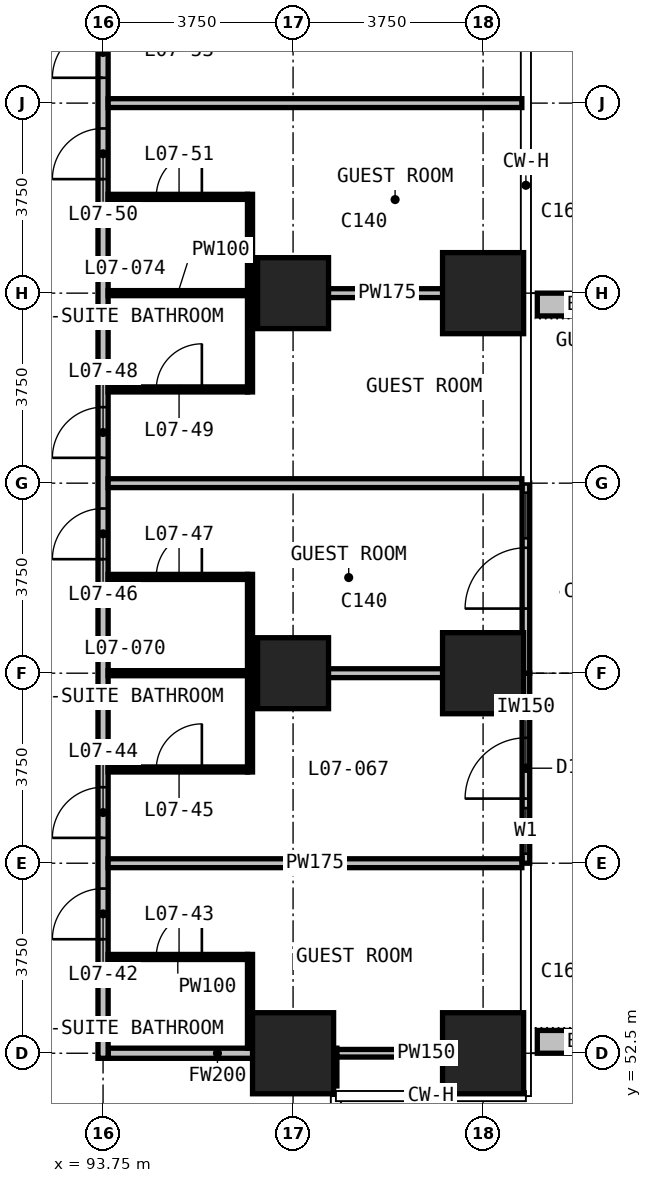
"""IFC4 building model, lengths in metres.
Left out: names, types, materials, properties, quantities, classifications, styles, units other than length and angle.
Written with IfcOpenShell. Run it as: python <this file> out.ifc"""

import sys

from ifc_helpers import new_model, si_unit, direction, frame, frame_2d, origin, origin_2d, place, context, subcontext, project, spatial, rectangle, extrude, element, fill, save


model = new_model("IFC4")
c1 = context("Model", 3, precision=1e-05, world=origin(), true_north=direction((0.0, 1.0)))
c2 = subcontext(c1, "Body", "Model", "MODEL_VIEW")
j1 = project(units=[si_unit("LENGTHUNIT", "METRE"), si_unit("PLANEANGLEUNIT", "RADIAN")], contexts=[c1])
p1 = place(None, origin())
s1 = spatial("IfcSite", under=j1, at=p1, CompositionType="ELEMENT")
p2 = place(p1, origin())
s2 = spatial("IfcBuilding", under=s1, at=p2, CompositionType="ELEMENT")
p3 = place(p2, frame((0.0, 0.0, 42.8)))
s3 = spatial("IfcBuildingStorey", under=s2, at=p3, CompositionType="ELEMENT", Elevation=42.8)
p4 = place(p3, frame((97.5, 52.5, 0.0), z_axis=(0.0, 0.0, 1.0), x_axis=(1.0, 0.0, 0.0)))
e1 = element("IfcColumn", 1, at=p4, inside=s3, PredefinedType="COLUMN", context=c2, shape_type="SweptSolid", body=[
    extrude(rectangle(XDim=1.6, YDim=1.6, at=origin_2d()), origin(), (0.0, 0.0, 1.0), 3.3),
])
for number, where, z_axis, x_axis in (
    (2, (97.5, 60.0, 0.0), (0.0, 0.0, 1.0), (1.0, 0.0, 0.0)),
    (3, (97.5, 67.5, 0.0), (0.0, 0.0, 1.0), (1.0, 0.0, 0.0)),
):
    element("IfcColumn", number, at=place(p3, frame(where, z_axis=z_axis, x_axis=x_axis)), inside=s3, PredefinedType="COLUMN", context=c2, shape_type="SweptSolid", body=[
        extrude(rectangle(XDim=1.4, YDim=1.4, at=origin_2d()), origin(), (0.0, 0.0, 1.0), 3.3),
    ])
for number, where, z_axis, x_axis in (
    (4, (101.25, 52.5, 0.0), (0.0, 0.0, 1.0), (1.0, 0.0, 0.0)),
    (5, (101.25, 60.0, 0.0), (0.0, 0.0, 1.0), (1.0, 0.0, 0.0)),
    (6, (101.25, 67.5, 0.0), (0.0, 0.0, 1.0), (1.0, 0.0, 0.0)),
):
    element("IfcColumn", number, at=place(p3, frame(where, z_axis=z_axis, x_axis=x_axis)), inside=s3, PredefinedType="COLUMN", context=c2, shape_type="SweptSolid", body=[
        extrude(rectangle(XDim=1.6, YDim=1.6, at=origin_2d()), origin(), (0.0, 0.0, 1.0), 3.3),
    ])
p5 = place(p3, frame((102.095, 56.25, 0.0), z_axis=(0.0, 0.0, 1.0), x_axis=(0.0, 1.0, 0.0)))
e7 = element("IfcWall", 7, at=p5, inside=s3, PredefinedType="SOLIDWALL", context=c2, shape_type="SweptSolid", body=[
    extrude(rectangle(XDim=3.75, YDim=0.15, at=frame_2d((1.875, 0.0))), origin(), (0.0, 0.0, 1.0), 3.0),
])
p6 = place(p5, frame((0.188, 0.0, 0.1)))
e8 = element("IfcOpeningElement", 8, at=p6, cuts=e7, PredefinedType="OPENING", context=c2, shape_type="SweptSolid", body=[
    extrude(rectangle(XDim=0.9, YDim=2.4, at=frame_2d((0.45, 1.2))), frame((0.0, 0.085, 0.0), z_axis=(0.0, -1.0, 0.0), x_axis=(1.0, 0.0, 0.0)), (0.0, 0.0, 1.0), 0.17),
])
p7 = place(p5, frame((1.275, 0.0, 0.0)))
e9 = element("IfcOpeningElement", 9, at=p7, cuts=e7, PredefinedType="OPENING", context=c2, shape_type="SweptSolid", body=[
    extrude(rectangle(XDim=1.2, YDim=2.4, at=frame_2d((0.6, 1.2))), frame((0.0, 0.085, 0.0), z_axis=(0.0, -1.0, 0.0), x_axis=(1.0, 0.0, 0.0)), (0.0, 0.0, 1.0), 0.17),
])
p8 = place(p3, frame((102.095, 60.0, 0.0), z_axis=(0.0, 0.0, 1.0), x_axis=(0.0, 1.0, 0.0)))
e10 = element("IfcWall", 10, at=p8, inside=s3, PredefinedType="SOLIDWALL", context=c2, shape_type="SweptSolid", body=[
    extrude(rectangle(XDim=3.75, YDim=0.15, at=frame_2d((1.875, 0.0))), origin(), (0.0, 0.0, 1.0), 3.0),
])
p9 = place(p8, frame((1.275, 0.0, 0.0)))
e11 = element("IfcOpeningElement", 11, at=p9, cuts=e10, PredefinedType="OPENING", context=c2, shape_type="SweptSolid", body=[
    extrude(rectangle(XDim=1.2, YDim=2.4, at=frame_2d((0.6, 1.2))), frame((0.0, 0.085, 0.0), z_axis=(0.0, -1.0, 0.0), x_axis=(1.0, 0.0, 0.0)), (0.0, 0.0, 1.0), 0.17),
])
p10 = place(p8, frame((2.663, 0.0, 0.1)))
e12 = element("IfcOpeningElement", 12, at=p10, cuts=e10, PredefinedType="OPENING", context=c2, shape_type="SweptSolid", body=[
    extrude(rectangle(XDim=0.9, YDim=2.4, at=frame_2d((0.45, 1.2))), frame((0.0, 0.085, 0.0), z_axis=(0.0, -1.0, 0.0), x_axis=(1.0, 0.0, 0.0)), (0.0, 0.0, 1.0), 0.17),
])
for number, where, z_axis, x_axis in (
    (13, (102.32, 52.725, 0.0), (0.0, 0.0, 1.0), (1.0, 0.0, 0.0)),
    (14, (102.32, 67.275, 0.0), (0.0, 0.0, 1.0), (1.0, 0.0, 0.0)),
):
    element("IfcWall", number, at=place(p3, frame(where, z_axis=z_axis, x_axis=x_axis)), inside=s3, PredefinedType="USERDEFINED", context=c2, shape_type="SweptSolid", body=[
        extrude(rectangle(XDim=2.33, YDim=0.45, at=frame_2d((1.165, 0.0))), origin(), (0.0, 0.0, 1.0), 1.1),
    ])
p11 = place(p3, frame((93.85, 52.5, 0.0), z_axis=(0.0, 0.0, 1.0), x_axis=(1.0, 0.0, 0.0)))
e15 = element("IfcWall", 15, at=p11, inside=s3, PredefinedType="PARTITIONING", context=c2, shape_type="SweptSolid", body=[
    extrude(rectangle(XDim=4.315, YDim=0.2, at=frame_2d((2.157, 0.0))), origin(), (0.0, 0.0, 1.0), 3.0),
])
p12 = place(p3, frame((93.75, 52.4, 0.0), z_axis=(0.0, 0.0, 1.0), x_axis=(0.0, 1.0, 0.0)))
e16 = element("IfcWall", 16, at=p12, inside=s3, PredefinedType="PARTITIONING", context=c2, shape_type="SweptSolid", body=[
    extrude(rectangle(XDim=33.925, YDim=0.2, at=frame_2d((16.962, 0.0))), origin(), (0.0, 0.0, 1.0), 3.0),
])
p13 = place(p12, frame((2.35, 0.0, 0.0)))
e17 = element("IfcOpeningElement", 17, at=p13, cuts=e16, PredefinedType="OPENING", context=c2, shape_type="SweptSolid", body=[
    extrude(rectangle(XDim=1.0, YDim=2.2, at=frame_2d((0.5, 1.1))), frame((0.0, 0.11, 0.0), z_axis=(0.0, -1.0, 0.0), x_axis=(1.0, 0.0, 0.0)), (0.0, 0.0, 1.0), 0.22),
])
p14 = place(p12, frame((4.35, 0.0, 0.0)))
e18 = element("IfcOpeningElement", 18, at=p14, cuts=e16, PredefinedType="OPENING", context=c2, shape_type="SweptSolid", body=[
    extrude(rectangle(XDim=1.0, YDim=2.2, at=frame_2d((0.5, 1.1))), frame((0.0, 0.11, 0.0), z_axis=(0.0, -1.0, 0.0), x_axis=(1.0, 0.0, 0.0)), (0.0, 0.0, 1.0), 0.22),
])
p15 = place(p12, frame((9.85, 0.0, 0.0)))
e19 = element("IfcOpeningElement", 19, at=p15, cuts=e16, PredefinedType="OPENING", context=c2, shape_type="SweptSolid", body=[
    extrude(rectangle(XDim=1.0, YDim=2.2, at=frame_2d((0.5, 1.1))), frame((0.0, 0.11, 0.0), z_axis=(0.0, -1.0, 0.0), x_axis=(1.0, 0.0, 0.0)), (0.0, 0.0, 1.0), 0.22),
])
p16 = place(p12, frame((11.85, 0.0, 0.0)))
e20 = element("IfcOpeningElement", 20, at=p16, cuts=e16, PredefinedType="OPENING", context=c2, shape_type="SweptSolid", body=[
    extrude(rectangle(XDim=1.0, YDim=2.2, at=frame_2d((0.5, 1.1))), frame((0.0, 0.11, 0.0), z_axis=(0.0, -1.0, 0.0), x_axis=(1.0, 0.0, 0.0)), (0.0, 0.0, 1.0), 0.22),
])
p17 = place(p12, frame((17.35, 0.0, 0.0)))
e21 = element("IfcOpeningElement", 21, at=p17, cuts=e16, PredefinedType="OPENING", context=c2, shape_type="SweptSolid", body=[
    extrude(rectangle(XDim=1.0, YDim=2.2, at=frame_2d((0.5, 1.1))), frame((0.0, 0.11, 0.0), z_axis=(0.0, -1.0, 0.0), x_axis=(1.0, 0.0, 0.0)), (0.0, 0.0, 1.0), 0.22),
])
p18 = place(p12, frame((19.35, 0.0, 0.0)))
e22 = element("IfcOpeningElement", 22, at=p18, cuts=e16, PredefinedType="OPENING", context=c2, shape_type="SweptSolid", body=[
    extrude(rectangle(XDim=1.0, YDim=2.2, at=frame_2d((0.5, 1.1))), frame((0.0, 0.11, 0.0), z_axis=(0.0, -1.0, 0.0), x_axis=(1.0, 0.0, 0.0)), (0.0, 0.0, 1.0), 0.22),
])
p19 = place(p12, frame((24.85, 0.0, 0.0)))
e23 = element("IfcOpeningElement", 23, at=p19, cuts=e16, PredefinedType="OPENING", context=c2, shape_type="SweptSolid", body=[
    extrude(rectangle(XDim=1.0, YDim=2.2, at=frame_2d((0.5, 1.1))), frame((0.0, 0.11, 0.0), z_axis=(0.0, -1.0, 0.0), x_axis=(1.0, 0.0, 0.0)), (0.0, 0.0, 1.0), 0.22),
])
p20 = place(p12, frame((26.85, 0.0, 0.0)))
e24 = element("IfcOpeningElement", 24, at=p20, cuts=e16, PredefinedType="OPENING", context=c2, shape_type="SweptSolid", body=[
    extrude(rectangle(XDim=1.0, YDim=2.2, at=frame_2d((0.5, 1.1))), frame((0.0, 0.11, 0.0), z_axis=(0.0, -1.0, 0.0), x_axis=(1.0, 0.0, 0.0)), (0.0, 0.0, 1.0), 0.22),
])
p21 = place(p12, frame((31.55, 0.0, 0.0)))
e25 = element("IfcOpeningElement", 25, at=p21, cuts=e16, PredefinedType="OPENING", context=c2, shape_type="SweptSolid", body=[
    extrude(rectangle(XDim=0.9, YDim=2.2, at=frame_2d((0.45, 1.1))), frame((0.0, 0.11, 0.0), z_axis=(0.0, -1.0, 0.0), x_axis=(1.0, 0.0, 0.0)), (0.0, 0.0, 1.0), 0.22),
])
p22 = place(p3, frame((98.265, 51.855, 0.0), z_axis=(0.0, 0.0, 1.0), x_axis=(0.0, 1.0, 0.0)))
e26 = element("IfcWall", 26, at=p22, inside=s3, PredefinedType="PARTITIONING", context=c2, shape_type="SweptSolid", body=[
    extrude(rectangle(XDim=0.745, YDim=0.2, at=frame_2d((0.373, 0.0))), origin(), (0.0, 0.0, 1.0), 3.0),
])
p23 = place(p3, frame((93.85, 56.25, 0.0), z_axis=(0.0, 0.0, 1.0), x_axis=(1.0, 0.0, 0.0)))
e27 = element("IfcWall", 27, at=p23, inside=s3, PredefinedType="PARTITIONING", context=c2, shape_type="SweptSolid", body=[
    extrude(rectangle(XDim=8.165, YDim=0.175, at=frame_2d((4.083, 0.0))), origin(), (0.0, 0.0, 1.0), 3.0),
])
p24 = place(p3, frame((96.7, 60.0, 0.0), z_axis=(0.0, 0.0, 1.0), x_axis=(1.0, 0.0, 0.0)))
e28 = element("IfcWall", 28, at=p24, inside=s3, PredefinedType="PARTITIONING", context=c2, shape_type="SweptSolid", body=[
    extrude(rectangle(XDim=5.315, YDim=0.175, at=frame_2d((2.657, 0.0))), origin(), (0.0, 0.0, 1.0), 3.0),
])
p25 = place(p3, frame((93.85, 63.75, 0.0), z_axis=(0.0, 0.0, 1.0), x_axis=(1.0, 0.0, 0.0)))
e29 = element("IfcWall", 29, at=p25, inside=s3, PredefinedType="PARTITIONING", context=c2, shape_type="SweptSolid", body=[
    extrude(rectangle(XDim=8.165, YDim=0.175, at=frame_2d((4.083, 0.0))), origin(), (0.0, 0.0, 1.0), 3.0),
])
p26 = place(p3, frame((96.7, 67.5, 0.0), z_axis=(0.0, 0.0, 1.0), x_axis=(1.0, 0.0, 0.0)))
e30 = element("IfcWall", 30, at=p26, inside=s3, PredefinedType="PARTITIONING", context=c2, shape_type="SweptSolid", body=[
    extrude(rectangle(XDim=5.315, YDim=0.175, at=frame_2d((2.657, 0.0))), origin(), (0.0, 0.0, 1.0), 3.0),
])
p27 = place(p3, frame((93.85, 71.25, 0.0), z_axis=(0.0, 0.0, 1.0), x_axis=(1.0, 0.0, 0.0)))
e31 = element("IfcWall", 31, at=p27, inside=s3, PredefinedType="PARTITIONING", context=c2, shape_type="SweptSolid", body=[
    extrude(rectangle(XDim=8.165, YDim=0.175, at=frame_2d((4.083, 0.0))), origin(), (0.0, 0.0, 1.0), 3.0),
])
p28 = place(p3, frame((98.365, 52.5, 0.0), z_axis=(0.0, 0.0, 1.0), x_axis=(1.0, 0.0, 0.0)))
e32 = element("IfcWall", 32, at=p28, inside=s3, PredefinedType="PARTITIONING", context=c2, shape_type="SweptSolid", body=[
    extrude(rectangle(XDim=3.53, YDim=0.15, at=frame_2d((1.765, 0.0))), origin(), (0.0, 0.0, 1.0), 3.0),
])
p29 = place(p3, frame((93.85, 54.4, 0.0), z_axis=(0.0, 0.0, 1.0), x_axis=(1.0, 0.0, 0.0)))
e33 = element("IfcWall", 33, at=p29, inside=s3, PredefinedType="PARTITIONING", context=c2, shape_type="SweptSolid", body=[
    extrude(rectangle(XDim=2.75, YDim=0.1, at=frame_2d((1.375, 0.0))), origin(), (0.0, 0.0, 1.0), 3.0),
])
p30 = place(p29, frame((0.95, 0.0, 0.0)))
e34 = element("IfcOpeningElement", 34, at=p30, cuts=e33, PredefinedType="OPENING", context=c2, shape_type="SweptSolid", body=[
    extrude(rectangle(XDim=0.9, YDim=2.2, at=frame_2d((0.45, 1.1))), frame((0.0, 0.06, 0.0), z_axis=(0.0, -1.0, 0.0), x_axis=(1.0, 0.0, 0.0)), (0.0, 0.0, 1.0), 0.12),
])
p31 = place(p3, frame((93.85, 58.1, 0.0), z_axis=(0.0, 0.0, 1.0), x_axis=(1.0, 0.0, 0.0)))
e35 = element("IfcWall", 35, at=p31, inside=s3, PredefinedType="PARTITIONING", context=c2, shape_type="SweptSolid", body=[
    extrude(rectangle(XDim=2.75, YDim=0.1, at=frame_2d((1.375, 0.0))), origin(), (0.0, 0.0, 1.0), 3.0),
])
p32 = place(p31, frame((0.95, 0.0, 0.0)))
e36 = element("IfcOpeningElement", 36, at=p32, cuts=e35, PredefinedType="OPENING", context=c2, shape_type="SweptSolid", body=[
    extrude(rectangle(XDim=0.9, YDim=2.2, at=frame_2d((0.45, 1.1))), frame((0.0, 0.06, 0.0), z_axis=(0.0, -1.0, 0.0), x_axis=(1.0, 0.0, 0.0)), (0.0, 0.0, 1.0), 0.12),
])
p33 = place(p3, frame((93.85, 60.0, 0.0), z_axis=(0.0, 0.0, 1.0), x_axis=(1.0, 0.0, 0.0)))
e37 = element("IfcWall", 37, at=p33, inside=s3, PredefinedType="PARTITIONING", context=c2, shape_type="SweptSolid", body=[
    extrude(rectangle(XDim=2.75, YDim=0.1, at=frame_2d((1.375, 0.0))), origin(), (0.0, 0.0, 1.0), 3.0),
])
p34 = place(p3, frame((93.85, 61.9, 0.0), z_axis=(0.0, 0.0, 1.0), x_axis=(1.0, 0.0, 0.0)))
e38 = element("IfcWall", 38, at=p34, inside=s3, PredefinedType="PARTITIONING", context=c2, shape_type="SweptSolid", body=[
    extrude(rectangle(XDim=2.75, YDim=0.1, at=frame_2d((1.375, 0.0))), origin(), (0.0, 0.0, 1.0), 3.0),
])
p35 = place(p34, frame((0.95, 0.0, 0.0)))
e39 = element("IfcOpeningElement", 39, at=p35, cuts=e38, PredefinedType="OPENING", context=c2, shape_type="SweptSolid", body=[
    extrude(rectangle(XDim=0.9, YDim=2.2, at=frame_2d((0.45, 1.1))), frame((0.0, 0.06, 0.0), z_axis=(0.0, -1.0, 0.0), x_axis=(1.0, 0.0, 0.0)), (0.0, 0.0, 1.0), 0.12),
])
p36 = place(p3, frame((93.85, 65.6, 0.0), z_axis=(0.0, 0.0, 1.0), x_axis=(1.0, 0.0, 0.0)))
e40 = element("IfcWall", 40, at=p36, inside=s3, PredefinedType="PARTITIONING", context=c2, shape_type="SweptSolid", body=[
    extrude(rectangle(XDim=2.75, YDim=0.1, at=frame_2d((1.375, 0.0))), origin(), (0.0, 0.0, 1.0), 3.0),
])
p37 = place(p36, frame((0.95, 0.0, 0.0)))
e41 = element("IfcOpeningElement", 41, at=p37, cuts=e40, PredefinedType="OPENING", context=c2, shape_type="SweptSolid", body=[
    extrude(rectangle(XDim=0.9, YDim=2.2, at=frame_2d((0.45, 1.1))), frame((0.0, 0.06, 0.0), z_axis=(0.0, -1.0, 0.0), x_axis=(1.0, 0.0, 0.0)), (0.0, 0.0, 1.0), 0.12),
])
p38 = place(p3, frame((93.85, 67.5, 0.0), z_axis=(0.0, 0.0, 1.0), x_axis=(1.0, 0.0, 0.0)))
e42 = element("IfcWall", 42, at=p38, inside=s3, PredefinedType="PARTITIONING", context=c2, shape_type="SweptSolid", body=[
    extrude(rectangle(XDim=2.75, YDim=0.1, at=frame_2d((1.375, 0.0))), origin(), (0.0, 0.0, 1.0), 3.0),
])
p39 = place(p3, frame((93.85, 69.4, 0.0), z_axis=(0.0, 0.0, 1.0), x_axis=(1.0, 0.0, 0.0)))
e43 = element("IfcWall", 43, at=p39, inside=s3, PredefinedType="PARTITIONING", context=c2, shape_type="SweptSolid", body=[
    extrude(rectangle(XDim=2.75, YDim=0.1, at=frame_2d((1.375, 0.0))), origin(), (0.0, 0.0, 1.0), 3.0),
])
p40 = place(p39, frame((0.95, 0.0, 0.0)))
e44 = element("IfcOpeningElement", 44, at=p40, cuts=e43, PredefinedType="OPENING", context=c2, shape_type="SweptSolid", body=[
    extrude(rectangle(XDim=0.9, YDim=2.2, at=frame_2d((0.45, 1.1))), frame((0.0, 0.06, 0.0), z_axis=(0.0, -1.0, 0.0), x_axis=(1.0, 0.0, 0.0)), (0.0, 0.0, 1.0), 0.12),
])
p41 = place(p3, frame((96.65, 52.6, 0.0), z_axis=(0.0, 0.0, 1.0), x_axis=(0.0, 1.0, 0.0)))
e45 = element("IfcWall", 45, at=p41, inside=s3, PredefinedType="PARTITIONING", context=c2, shape_type="SweptSolid", body=[
    extrude(rectangle(XDim=1.85, YDim=0.1, at=frame_2d((0.925, 0.0))), origin(), (0.0, 0.0, 1.0), 3.0),
])
for number, where, z_axis, x_axis in (
    (46, (96.65, 58.05, 0.0), (0.0, 0.0, 1.0), (0.0, 1.0, 0.0)),
    (47, (96.65, 65.55, 0.0), (0.0, 0.0, 1.0), (0.0, 1.0, 0.0)),
):
    element("IfcWall", number, at=place(p3, frame(where, z_axis=z_axis, x_axis=x_axis)), inside=s3, PredefinedType="PARTITIONING", context=c2, shape_type="SweptSolid", body=[
        extrude(rectangle(XDim=3.9, YDim=0.1, at=frame_2d((1.95, 0.0))), origin(), (0.0, 0.0, 1.0), 3.0),
    ])
p42 = place(p6, origin())
e48 = element("IfcWindow", 48, at=p42, inside=s3, PartitioningType="SINGLE_PANEL", PredefinedType="WINDOW", context=c2, shape_type="SweptSolid", body=[
    extrude(rectangle(XDim=0.9, YDim=2.4, at=frame_2d((0.45, 1.2))), frame((0.0, 0.03, 0.0), z_axis=(0.0, -1.0, 0.0), x_axis=(1.0, 0.0, 0.0)), (0.0, 0.0, 1.0), 0.06),
])
fill(e8, e48)
p43 = place(p7, origin())
e49 = element("IfcDoor", 49, at=p43, inside=s3, OperationType="SINGLE_SWING_LEFT", PredefinedType="DOOR", context=c2, shape_type="SweptSolid", body=[
    extrude(rectangle(XDim=1.2, YDim=2.4, at=frame_2d((0.6, 1.2))), frame((0.0, 0.025, 0.0), z_axis=(0.0, -1.0, 0.0), x_axis=(1.0, 0.0, 0.0)), (0.0, 0.0, 1.0), 0.05),
])
fill(e9, e49)
p44 = place(p9, origin())
e50 = element("IfcDoor", 50, at=p44, inside=s3, OperationType="SINGLE_SWING_LEFT", PredefinedType="DOOR", context=c2, shape_type="SweptSolid", body=[
    extrude(rectangle(XDim=1.2, YDim=2.4, at=frame_2d((0.6, 1.2))), frame((0.0, 0.025, 0.0), z_axis=(0.0, -1.0, 0.0), x_axis=(1.0, 0.0, 0.0)), (0.0, 0.0, 1.0), 0.05),
])
fill(e11, e50)
p45 = place(p10, origin())
e51 = element("IfcWindow", 51, at=p45, inside=s3, PartitioningType="SINGLE_PANEL", PredefinedType="WINDOW", context=c2, shape_type="SweptSolid", body=[
    extrude(rectangle(XDim=0.9, YDim=2.4, at=frame_2d((0.45, 1.2))), frame((0.0, 0.03, 0.0), z_axis=(0.0, -1.0, 0.0), x_axis=(1.0, 0.0, 0.0)), (0.0, 0.0, 1.0), 0.06),
])
fill(e12, e51)
p46 = place(p13, origin())
e52 = element("IfcDoor", 52, at=p46, inside=s3, OperationType="SINGLE_SWING_RIGHT", PredefinedType="DOOR", context=c2, shape_type="SweptSolid", body=[
    extrude(rectangle(XDim=1.0, YDim=2.2, at=frame_2d((0.5, 1.1))), frame((0.0, 0.025, 0.0), z_axis=(0.0, -1.0, 0.0), x_axis=(1.0, 0.0, 0.0)), (0.0, 0.0, 1.0), 0.05),
])
fill(e17, e52)
p47 = place(p30, origin())
e53 = element("IfcDoor", 53, at=p47, inside=s3, OperationType="SINGLE_SWING_RIGHT", PredefinedType="DOOR", context=c2, shape_type="SweptSolid", body=[
    extrude(rectangle(XDim=0.9, YDim=2.2, at=frame_2d((0.45, 1.1))), frame((0.0, 0.025, 0.0), z_axis=(0.0, -1.0, 0.0), x_axis=(1.0, 0.0, 0.0)), (0.0, 0.0, 1.0), 0.05),
])
fill(e34, e53)
p48 = place(p14, origin())
e54 = element("IfcDoor", 54, at=p48, inside=s3, OperationType="SINGLE_SWING_LEFT", PredefinedType="DOOR", context=c2, shape_type="SweptSolid", body=[
    extrude(rectangle(XDim=1.0, YDim=2.2, at=frame_2d((0.5, 1.1))), frame((0.0, 0.025, 0.0), z_axis=(0.0, -1.0, 0.0), x_axis=(1.0, 0.0, 0.0)), (0.0, 0.0, 1.0), 0.05),
])
fill(e18, e54)
p49 = place(p32, origin())
e55 = element("IfcDoor", 55, at=p49, inside=s3, OperationType="SINGLE_SWING_RIGHT", PredefinedType="DOOR", context=c2, shape_type="SweptSolid", body=[
    extrude(rectangle(XDim=0.9, YDim=2.2, at=frame_2d((0.45, 1.1))), frame((0.0, 0.025, 0.0), z_axis=(0.0, -1.0, 0.0), x_axis=(1.0, 0.0, 0.0)), (0.0, 0.0, 1.0), 0.05),
])
fill(e36, e55)
p50 = place(p15, origin())
e56 = element("IfcDoor", 56, at=p50, inside=s3, OperationType="SINGLE_SWING_LEFT", PredefinedType="DOOR", context=c2, shape_type="SweptSolid", body=[
    extrude(rectangle(XDim=1.0, YDim=2.2, at=frame_2d((0.5, 1.1))), frame((0.0, 0.025, 0.0), z_axis=(0.0, -1.0, 0.0), x_axis=(1.0, 0.0, 0.0)), (0.0, 0.0, 1.0), 0.05),
])
fill(e19, e56)
p51 = place(p35, origin())
e57 = element("IfcDoor", 57, at=p51, inside=s3, OperationType="SINGLE_SWING_RIGHT", PredefinedType="DOOR", context=c2, shape_type="SweptSolid", body=[
    extrude(rectangle(XDim=0.9, YDim=2.2, at=frame_2d((0.45, 1.1))), frame((0.0, 0.025, 0.0), z_axis=(0.0, -1.0, 0.0), x_axis=(1.0, 0.0, 0.0)), (0.0, 0.0, 1.0), 0.05),
])
fill(e39, e57)
p52 = place(p16, origin())
e58 = element("IfcDoor", 58, at=p52, inside=s3, OperationType="SINGLE_SWING_LEFT", PredefinedType="DOOR", context=c2, shape_type="SweptSolid", body=[
    extrude(rectangle(XDim=1.0, YDim=2.2, at=frame_2d((0.5, 1.1))), frame((0.0, 0.025, 0.0), z_axis=(0.0, -1.0, 0.0), x_axis=(1.0, 0.0, 0.0)), (0.0, 0.0, 1.0), 0.05),
])
fill(e20, e58)
p53 = place(p37, origin())
e59 = element("IfcDoor", 59, at=p53, inside=s3, OperationType="SINGLE_SWING_RIGHT", PredefinedType="DOOR", context=c2, shape_type="SweptSolid", body=[
    extrude(rectangle(XDim=0.9, YDim=2.2, at=frame_2d((0.45, 1.1))), frame((0.0, 0.025, 0.0), z_axis=(0.0, -1.0, 0.0), x_axis=(1.0, 0.0, 0.0)), (0.0, 0.0, 1.0), 0.05),
])
fill(e41, e59)
p54 = place(p17, origin())
e60 = element("IfcDoor", 60, at=p54, inside=s3, OperationType="SINGLE_SWING_LEFT", PredefinedType="DOOR", context=c2, shape_type="SweptSolid", body=[
    extrude(rectangle(XDim=1.0, YDim=2.2, at=frame_2d((0.5, 1.1))), frame((0.0, 0.025, 0.0), z_axis=(0.0, -1.0, 0.0), x_axis=(1.0, 0.0, 0.0)), (0.0, 0.0, 1.0), 0.05),
])
fill(e21, e60)
p55 = place(p40, origin())
e61 = element("IfcDoor", 61, at=p55, inside=s3, OperationType="SINGLE_SWING_RIGHT", PredefinedType="DOOR", context=c2, shape_type="SweptSolid", body=[
    extrude(rectangle(XDim=0.9, YDim=2.2, at=frame_2d((0.45, 1.1))), frame((0.0, 0.025, 0.0), z_axis=(0.0, -1.0, 0.0), x_axis=(1.0, 0.0, 0.0)), (0.0, 0.0, 1.0), 0.05),
])
fill(e44, e61)
p56 = place(p18, origin())
e62 = element("IfcDoor", 62, at=p56, inside=s3, OperationType="SINGLE_SWING_RIGHT", PredefinedType="DOOR", context=c2, shape_type="SweptSolid", body=[
    extrude(rectangle(XDim=1.0, YDim=2.2, at=frame_2d((0.5, 1.1))), frame((0.0, 0.025, 0.0), z_axis=(0.0, -1.0, 0.0), x_axis=(1.0, 0.0, 0.0)), (0.0, 0.0, 1.0), 0.05),
])
fill(e22, e62)
save(model, sys.argv[1])
